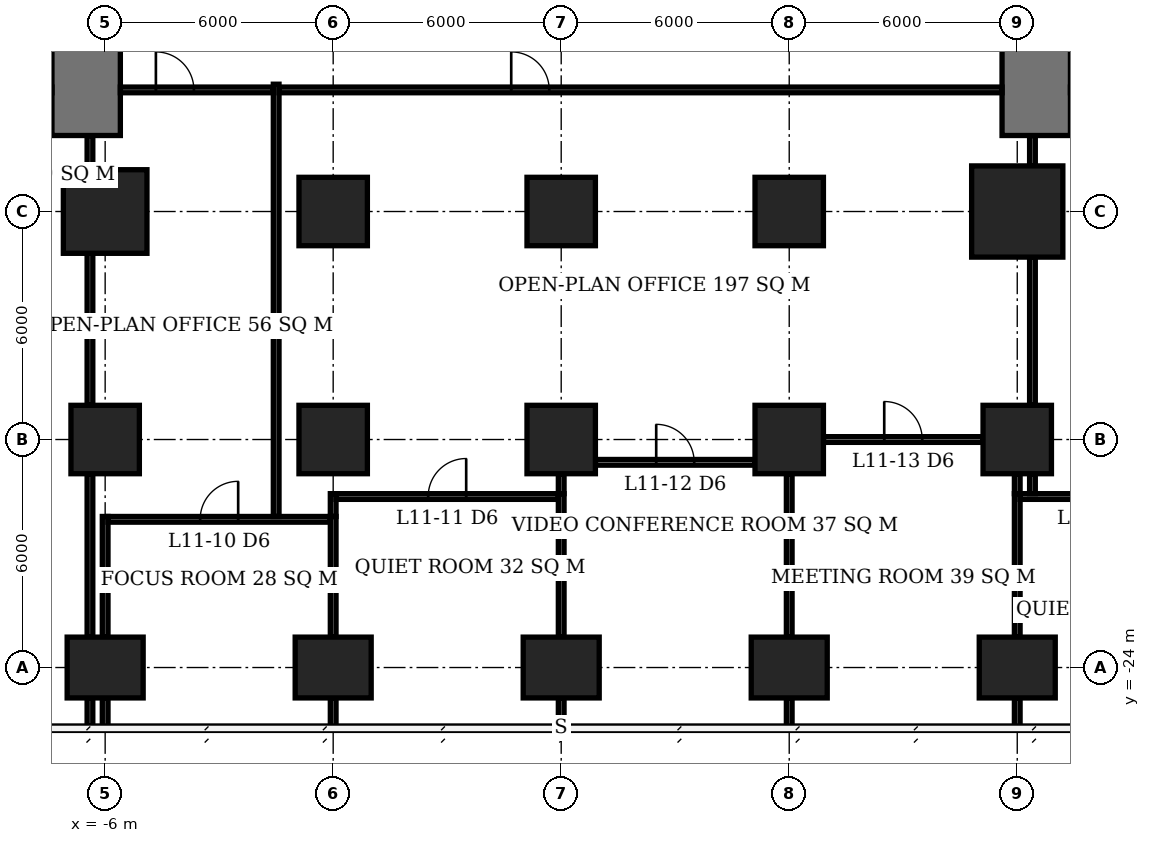
"""IFC4 building model, lengths in metres.
Left out: names, types, materials, properties, quantities, classifications, styles, units other than length and angle.
Written with IfcOpenShell. Run it as: python <this file> out.ifc"""

import sys

from ifc_helpers import new_model, si_unit, direction, frame, frame_2d, origin, origin_2d, place, context, subcontext, project, spatial, rectangle, extrude, element, fill, save


model = new_model("IFC4")
c1 = context("Model", 3, precision=1e-05, world=origin(), true_north=direction((0.0, 1.0)))
c2 = subcontext(c1, "Body", "Model", "MODEL_VIEW")
j1 = project(units=[si_unit("LENGTHUNIT", "METRE"), si_unit("PLANEANGLEUNIT", "RADIAN")], contexts=[c1])
p1 = place(None, origin())
s1 = spatial("IfcSite", under=j1, at=p1, CompositionType="ELEMENT")
p2 = place(p1, origin())
s2 = spatial("IfcBuilding", under=s1, at=p2, CompositionType="ELEMENT")
p3 = place(p2, frame((0.0, 0.0, 49.4)))
s3 = spatial("IfcBuildingStorey", under=s2, at=p3, CompositionType="ELEMENT", Elevation=49.4)
p4 = place(p3, frame((-6.0, -24.0, 0.0), z_axis=(0.0, 0.0, 1.0), x_axis=(1.0, 0.0, 0.0)))
e1 = element("IfcColumn", 1, at=p4, inside=s3, PredefinedType="COLUMN", context=c2, shape_type="SweptSolid", body=[
    extrude(rectangle(XDim=2.0, YDim=1.6, at=origin_2d()), origin(), (0.0, 0.0, 1.0), 3.9),
])
p5 = place(p3, frame((-6.0, -18.0, 0.0), z_axis=(0.0, 0.0, 1.0), x_axis=(1.0, 0.0, 0.0)))
e2 = element("IfcColumn", 2, at=p5, inside=s3, PredefinedType="COLUMN", context=c2, shape_type="SweptSolid", body=[
    extrude(rectangle(XDim=1.8, YDim=1.8, at=origin_2d()), origin(), (0.0, 0.0, 1.0), 3.9),
])
p6 = place(p3, frame((-6.0, -12.0, 0.0), z_axis=(0.0, 0.0, 1.0), x_axis=(1.0, 0.0, 0.0)))
e3 = element("IfcColumn", 3, at=p6, inside=s3, PredefinedType="COLUMN", context=c2, shape_type="SweptSolid", body=[
    extrude(rectangle(XDim=2.2, YDim=2.2, at=origin_2d()), origin(), (0.0, 0.0, 1.0), 3.9),
])
p7 = place(p3, frame((0.0, -24.0, 0.0), z_axis=(0.0, 0.0, 1.0), x_axis=(1.0, 0.0, 0.0)))
e4 = element("IfcColumn", 4, at=p7, inside=s3, PredefinedType="COLUMN", context=c2, shape_type="SweptSolid", body=[
    extrude(rectangle(XDim=2.0, YDim=1.6, at=origin_2d()), origin(), (0.0, 0.0, 1.0), 3.9),
])
for number, where, z_axis, x_axis in (
    (5, (0.0, -18.0, 0.0), (0.0, 0.0, 1.0), (1.0, 0.0, 0.0)),
    (6, (0.0, -12.0, 0.0), (0.0, 0.0, 1.0), (1.0, 0.0, 0.0)),
):
    element("IfcColumn", number, at=place(p3, frame(where, z_axis=z_axis, x_axis=x_axis)), inside=s3, PredefinedType="COLUMN", context=c2, shape_type="SweptSolid", body=[
        extrude(rectangle(XDim=1.8, YDim=1.8, at=origin_2d()), origin(), (0.0, 0.0, 1.0), 3.9),
    ])
p8 = place(p3, frame((6.0, -24.0, 0.0), z_axis=(0.0, 0.0, 1.0), x_axis=(1.0, 0.0, 0.0)))
e7 = element("IfcColumn", 7, at=p8, inside=s3, PredefinedType="COLUMN", context=c2, shape_type="SweptSolid", body=[
    extrude(rectangle(XDim=2.0, YDim=1.6, at=origin_2d()), origin(), (0.0, 0.0, 1.0), 3.9),
])
for number, where, z_axis, x_axis in (
    (8, (6.0, -18.0, 0.0), (0.0, 0.0, 1.0), (1.0, 0.0, 0.0)),
    (9, (6.0, -12.0, 0.0), (0.0, 0.0, 1.0), (1.0, 0.0, 0.0)),
):
    element("IfcColumn", number, at=place(p3, frame(where, z_axis=z_axis, x_axis=x_axis)), inside=s3, PredefinedType="COLUMN", context=c2, shape_type="SweptSolid", body=[
        extrude(rectangle(XDim=1.8, YDim=1.8, at=origin_2d()), origin(), (0.0, 0.0, 1.0), 3.9),
    ])
p9 = place(p3, frame((12.0, -24.0, 0.0), z_axis=(0.0, 0.0, 1.0), x_axis=(1.0, 0.0, 0.0)))
e10 = element("IfcColumn", 10, at=p9, inside=s3, PredefinedType="COLUMN", context=c2, shape_type="SweptSolid", body=[
    extrude(rectangle(XDim=2.0, YDim=1.6, at=origin_2d()), origin(), (0.0, 0.0, 1.0), 3.9),
])
for number, where, z_axis, x_axis in (
    (11, (12.0, -18.0, 0.0), (0.0, 0.0, 1.0), (1.0, 0.0, 0.0)),
    (12, (12.0, -12.0, 0.0), (0.0, 0.0, 1.0), (1.0, 0.0, 0.0)),
):
    element("IfcColumn", number, at=place(p3, frame(where, z_axis=z_axis, x_axis=x_axis)), inside=s3, PredefinedType="COLUMN", context=c2, shape_type="SweptSolid", body=[
        extrude(rectangle(XDim=1.8, YDim=1.8, at=origin_2d()), origin(), (0.0, 0.0, 1.0), 3.9),
    ])
p10 = place(p3, frame((18.0, -24.0, 0.0), z_axis=(0.0, 0.0, 1.0), x_axis=(1.0, 0.0, 0.0)))
e13 = element("IfcColumn", 13, at=p10, inside=s3, PredefinedType="COLUMN", context=c2, shape_type="SweptSolid", body=[
    extrude(rectangle(XDim=2.0, YDim=1.6, at=origin_2d()), origin(), (0.0, 0.0, 1.0), 3.9),
])
p11 = place(p3, frame((18.0, -18.0, 0.0), z_axis=(0.0, 0.0, 1.0), x_axis=(1.0, 0.0, 0.0)))
e14 = element("IfcColumn", 14, at=p11, inside=s3, PredefinedType="COLUMN", context=c2, shape_type="SweptSolid", body=[
    extrude(rectangle(XDim=1.8, YDim=1.8, at=origin_2d()), origin(), (0.0, 0.0, 1.0), 3.9),
])
p12 = place(p3, frame((18.0, -12.0, 0.0), z_axis=(0.0, 0.0, 1.0), x_axis=(1.0, 0.0, 0.0)))
e15 = element("IfcColumn", 15, at=p12, inside=s3, PredefinedType="COLUMN", context=c2, shape_type="SweptSolid", body=[
    extrude(rectangle(XDim=2.4, YDim=2.4, at=origin_2d()), origin(), (0.0, 0.0, 1.0), 3.9),
])
for number, where, z_axis, x_axis in (
    (16, (-6.5, -10.0, 0.0), (0.0, 0.0, 1.0), (0.0, 1.0, 0.0)),
    (17, (18.5, -10.0, 0.0), (0.0, 0.0, 1.0), (0.0, 1.0, 0.0)),
):
    element("IfcWall", number, at=place(p3, frame(where, z_axis=z_axis, x_axis=x_axis)), inside=s3, PredefinedType="SHEAR", context=c2, shape_type="SweptSolid", body=[
        extrude(rectangle(XDim=2.4, YDim=1.8, at=frame_2d((1.2, 0.0))), origin(), (0.0, 0.0, 1.0), 3.9),
    ])
p13 = place(p3, frame((-5.925, -20.1, 0.0), z_axis=(0.0, 0.0, 1.0), x_axis=(1.0, 0.0, 0.0)))
e18 = element("IfcWall", 18, at=p13, inside=s3, PredefinedType="PARTITIONING", context=c2, shape_type="SweptSolid", body=[
    extrude(rectangle(XDim=5.85, YDim=0.15, at=frame_2d((2.925, 0.0))), origin(), (0.0, 0.0, 1.0), 3.65),
])
p14 = place(p13, frame((2.425, 0.0, 0.0)))
e19 = element("IfcOpeningElement", 19, at=p14, cuts=e18, PredefinedType="OPENING", context=c2, shape_type="SweptSolid", body=[
    extrude(rectangle(XDim=1.0, YDim=2.1, at=frame_2d((0.5, 1.05))), frame((0.0, 0.085, 0.0), z_axis=(0.0, -1.0, 0.0), x_axis=(1.0, 0.0, 0.0)), (0.0, 0.0, 1.0), 0.17),
])
p15 = place(p3, frame((0.075, -19.5, 0.0), z_axis=(0.0, 0.0, 1.0), x_axis=(1.0, 0.0, 0.0)))
e20 = element("IfcWall", 20, at=p15, inside=s3, PredefinedType="PARTITIONING", context=c2, shape_type="SweptSolid", body=[
    extrude(rectangle(XDim=5.85, YDim=0.15, at=frame_2d((2.925, 0.0))), origin(), (0.0, 0.0, 1.0), 3.65),
])
p16 = place(p15, frame((2.425, 0.0, 0.0)))
e21 = element("IfcOpeningElement", 21, at=p16, cuts=e20, PredefinedType="OPENING", context=c2, shape_type="SweptSolid", body=[
    extrude(rectangle(XDim=1.0, YDim=2.1, at=frame_2d((0.5, 1.05))), frame((0.0, 0.085, 0.0), z_axis=(0.0, -1.0, 0.0), x_axis=(1.0, 0.0, 0.0)), (0.0, 0.0, 1.0), 0.17),
])
p17 = place(p3, frame((18.075, -19.5, 0.0), z_axis=(0.0, 0.0, 1.0), x_axis=(1.0, 0.0, 0.0)))
e22 = element("IfcWall", 22, at=p17, inside=s3, PredefinedType="PARTITIONING", context=c2, shape_type="SweptSolid", body=[
    extrude(rectangle(XDim=4.715, YDim=0.15, at=frame_2d((2.357, 0.0))), origin(), (0.0, 0.0, 1.0), 3.65),
])
p18 = place(p17, frame((1.82, 0.0, 0.0)))
e23 = element("IfcOpeningElement", 23, at=p18, cuts=e22, PredefinedType="OPENING", context=c2, shape_type="SweptSolid", body=[
    extrude(rectangle(XDim=1.0, YDim=2.1, at=frame_2d((0.5, 1.05))), frame((0.0, 0.085, 0.0), z_axis=(0.0, -1.0, 0.0), x_axis=(1.0, 0.0, 0.0)), (0.0, 0.0, 1.0), 0.17),
])
p19 = place(p3, frame((6.9, -18.6, 0.0), z_axis=(0.0, 0.0, 1.0), x_axis=(1.0, 0.0, 0.0)))
e24 = element("IfcWall", 24, at=p19, inside=s3, PredefinedType="PARTITIONING", context=c2, shape_type="SweptSolid", body=[
    extrude(rectangle(XDim=4.2, YDim=0.15, at=frame_2d((2.1, 0.0))), origin(), (0.0, 0.0, 1.0), 3.65),
])
p20 = place(p19, frame((1.6, 0.0, 0.0)))
e25 = element("IfcOpeningElement", 25, at=p20, cuts=e24, PredefinedType="OPENING", context=c2, shape_type="SweptSolid", body=[
    extrude(rectangle(XDim=1.0, YDim=2.1, at=frame_2d((0.5, 1.05))), frame((0.0, 0.085, 0.0), z_axis=(0.0, -1.0, 0.0), x_axis=(1.0, 0.0, 0.0)), (0.0, 0.0, 1.0), 0.17),
])
p21 = place(p3, frame((12.9, -18.0, 0.0), z_axis=(0.0, 0.0, 1.0), x_axis=(1.0, 0.0, 0.0)))
e26 = element("IfcWall", 26, at=p21, inside=s3, PredefinedType="PARTITIONING", context=c2, shape_type="SweptSolid", body=[
    extrude(rectangle(XDim=4.2, YDim=0.15, at=frame_2d((2.1, 0.0))), origin(), (0.0, 0.0, 1.0), 3.65),
])
p22 = place(p21, frame((1.6, 0.0, 0.0)))
e27 = element("IfcOpeningElement", 27, at=p22, cuts=e26, PredefinedType="OPENING", context=c2, shape_type="SweptSolid", body=[
    extrude(rectangle(XDim=1.0, YDim=2.1, at=frame_2d((0.5, 1.05))), frame((0.0, 0.085, 0.0), z_axis=(0.0, -1.0, 0.0), x_axis=(1.0, 0.0, 0.0)), (0.0, 0.0, 1.0), 0.17),
])
p23 = place(p3, frame((-6.0, -25.6, 0.0), z_axis=(0.0, 0.0, 1.0), x_axis=(0.0, 1.0, 0.0)))
e28 = element("IfcWall", 28, at=p23, inside=s3, PredefinedType="PARTITIONING", context=c2, shape_type="SweptSolid", body=[
    extrude(rectangle(XDim=0.8, YDim=0.15, at=frame_2d((0.4, 0.0))), origin(), (0.0, 0.0, 1.0), 3.65),
])
p24 = place(p3, frame((-6.0, -23.2, 0.0), z_axis=(0.0, 0.0, 1.0), x_axis=(0.0, 1.0, 0.0)))
e29 = element("IfcWall", 29, at=p24, inside=s3, PredefinedType="PARTITIONING", context=c2, shape_type="SweptSolid", body=[
    extrude(rectangle(XDim=3.175, YDim=0.15, at=frame_2d((1.587, 0.0))), origin(), (0.0, 0.0, 1.0), 3.65),
])
p25 = place(p3, frame((0.0, -25.6, 0.0), z_axis=(0.0, 0.0, 1.0), x_axis=(0.0, 1.0, 0.0)))
e30 = element("IfcWall", 30, at=p25, inside=s3, PredefinedType="PARTITIONING", context=c2, shape_type="SweptSolid", body=[
    extrude(rectangle(XDim=0.8, YDim=0.15, at=frame_2d((0.4, 0.0))), origin(), (0.0, 0.0, 1.0), 3.65),
])
p26 = place(p3, frame((0.0, -23.2, 0.0), z_axis=(0.0, 0.0, 1.0), x_axis=(0.0, 1.0, 0.0)))
e31 = element("IfcWall", 31, at=p26, inside=s3, PredefinedType="PARTITIONING", context=c2, shape_type="SweptSolid", body=[
    extrude(rectangle(XDim=3.175, YDim=0.15, at=frame_2d((1.587, 0.0))), origin(), (0.0, 0.0, 1.0), 3.65),
])
p27 = place(p3, frame((0.0, -20.025, 0.0), z_axis=(0.0, 0.0, 1.0), x_axis=(0.0, 1.0, 0.0)))
e32 = element("IfcWall", 32, at=p27, inside=s3, PredefinedType="PARTITIONING", context=c2, shape_type="SweptSolid", body=[
    extrude(rectangle(XDim=0.6, YDim=0.15, at=frame_2d((0.3, 0.0))), origin(), (0.0, 0.0, 1.0), 3.65),
])
p28 = place(p3, frame((6.0, -25.55, 0.0), z_axis=(0.0, 0.0, 1.0), x_axis=(0.0, 1.0, 0.0)))
e33 = element("IfcWall", 33, at=p28, inside=s3, PredefinedType="PARTITIONING", context=c2, shape_type="SweptSolid", body=[
    extrude(rectangle(XDim=0.75, YDim=0.15, at=frame_2d((0.375, 0.0))), origin(), (0.0, 0.0, 1.0), 3.65),
])
p29 = place(p3, frame((6.0, -23.2, 0.0), z_axis=(0.0, 0.0, 1.0), x_axis=(0.0, 1.0, 0.0)))
e34 = element("IfcWall", 34, at=p29, inside=s3, PredefinedType="PARTITIONING", context=c2, shape_type="SweptSolid", body=[
    extrude(rectangle(XDim=3.775, YDim=0.15, at=frame_2d((1.887, 0.0))), origin(), (0.0, 0.0, 1.0), 3.65),
])
p30 = place(p3, frame((6.0, -19.425, 0.0), z_axis=(0.0, 0.0, 1.0), x_axis=(0.0, 1.0, 0.0)))
e35 = element("IfcWall", 35, at=p30, inside=s3, PredefinedType="PARTITIONING", context=c2, shape_type="SweptSolid", body=[
    extrude(rectangle(XDim=0.525, YDim=0.15, at=frame_2d((0.263, 0.0))), origin(), (0.0, 0.0, 1.0), 3.65),
])
p31 = place(p3, frame((12.0, -25.6, 0.0), z_axis=(0.0, 0.0, 1.0), x_axis=(0.0, 1.0, 0.0)))
e36 = element("IfcWall", 36, at=p31, inside=s3, PredefinedType="PARTITIONING", context=c2, shape_type="SweptSolid", body=[
    extrude(rectangle(XDim=0.8, YDim=0.15, at=frame_2d((0.4, 0.0))), origin(), (0.0, 0.0, 1.0), 3.65),
])
p32 = place(p3, frame((12.0, -23.2, 0.0), z_axis=(0.0, 0.0, 1.0), x_axis=(0.0, 1.0, 0.0)))
e37 = element("IfcWall", 37, at=p32, inside=s3, PredefinedType="PARTITIONING", context=c2, shape_type="SweptSolid", body=[
    extrude(rectangle(XDim=4.3, YDim=0.15, at=frame_2d((2.15, 0.0))), origin(), (0.0, 0.0, 1.0), 3.65),
])
p33 = place(p3, frame((18.0, -25.6, 0.0), z_axis=(0.0, 0.0, 1.0), x_axis=(0.0, 1.0, 0.0)))
e38 = element("IfcWall", 38, at=p33, inside=s3, PredefinedType="PARTITIONING", context=c2, shape_type="SweptSolid", body=[
    extrude(rectangle(XDim=0.8, YDim=0.15, at=frame_2d((0.4, 0.0))), origin(), (0.0, 0.0, 1.0), 3.65),
])
p34 = place(p3, frame((18.0, -23.2, 0.0), z_axis=(0.0, 0.0, 1.0), x_axis=(0.0, 1.0, 0.0)))
e39 = element("IfcWall", 39, at=p34, inside=s3, PredefinedType="PARTITIONING", context=c2, shape_type="SweptSolid", body=[
    extrude(rectangle(XDim=3.775, YDim=0.15, at=frame_2d((1.887, 0.0))), origin(), (0.0, 0.0, 1.0), 3.65),
])
p35 = place(p3, frame((18.0, -19.425, 0.0), z_axis=(0.0, 0.0, 1.0), x_axis=(0.0, 1.0, 0.0)))
e40 = element("IfcWall", 40, at=p35, inside=s3, PredefinedType="PARTITIONING", context=c2, shape_type="SweptSolid", body=[
    extrude(rectangle(XDim=0.525, YDim=0.15, at=frame_2d((0.263, 0.0))), origin(), (0.0, 0.0, 1.0), 3.65),
])
p36 = place(p3, frame((-6.4, -25.55, 0.0), z_axis=(0.0, 0.0, 1.0), x_axis=(0.0, 1.0, 0.0)))
e41 = element("IfcWall", 41, at=p36, inside=s3, PredefinedType="PARTITIONING", context=c2, shape_type="SweptSolid", body=[
    extrude(rectangle(XDim=0.75, YDim=0.15, at=frame_2d((0.375, 0.0))), origin(), (0.0, 0.0, 1.0), 3.65),
])
p37 = place(p3, frame((-6.4, -23.2, 0.0), z_axis=(0.0, 0.0, 1.0), x_axis=(0.0, 1.0, 0.0)))
e42 = element("IfcWall", 42, at=p37, inside=s3, PredefinedType="PARTITIONING", context=c2, shape_type="SweptSolid", body=[
    extrude(rectangle(XDim=4.3, YDim=0.15, at=frame_2d((2.15, 0.0))), origin(), (0.0, 0.0, 1.0), 3.65),
])
p38 = place(p3, frame((-6.4, -17.1, 0.0), z_axis=(0.0, 0.0, 1.0), x_axis=(0.0, 1.0, 0.0)))
e43 = element("IfcWall", 43, at=p38, inside=s3, PredefinedType="PARTITIONING", context=c2, shape_type="SweptSolid", body=[
    extrude(rectangle(XDim=4.0, YDim=0.15, at=frame_2d((2.0, 0.0))), origin(), (0.0, 0.0, 1.0), 3.65),
])
p39 = place(p3, frame((-6.4, -10.9, 0.0), z_axis=(0.0, 0.0, 1.0), x_axis=(0.0, 1.0, 0.0)))
e44 = element("IfcWall", 44, at=p39, inside=s3, PredefinedType="PARTITIONING", context=c2, shape_type="SweptSolid", body=[
    extrude(rectangle(XDim=0.9, YDim=0.15, at=frame_2d((0.45, 0.0))), origin(), (0.0, 0.0, 1.0), 3.65),
])
p40 = place(p3, frame((-5.6, -8.8, 0.0), z_axis=(0.0, 0.0, 1.0), x_axis=(1.0, 0.0, 0.0)))
e45 = element("IfcWall", 45, at=p40, inside=s3, PredefinedType="PARTITIONING", context=c2, shape_type="SweptSolid", body=[
    extrude(rectangle(XDim=4.025, YDim=0.15, at=frame_2d((2.013, 0.0))), origin(), (0.0, 0.0, 1.0), 3.65),
])
p41 = place(p40, frame((0.935, 0.0, 0.0)))
e46 = element("IfcOpeningElement", 46, at=p41, cuts=e45, PredefinedType="OPENING", context=c2, shape_type="SweptSolid", body=[
    extrude(rectangle(XDim=1.0, YDim=2.1, at=frame_2d((0.5, 1.05))), frame((0.0, 0.085, 0.0), z_axis=(0.0, -1.0, 0.0), x_axis=(1.0, 0.0, 0.0)), (0.0, 0.0, 1.0), 0.17),
])
p42 = place(p3, frame((-1.5, -20.025, 0.0), z_axis=(0.0, 0.0, 1.0), x_axis=(0.0, 1.0, 0.0)))
e47 = element("IfcWall", 47, at=p42, inside=s3, PredefinedType="PARTITIONING", context=c2, shape_type="SweptSolid", body=[
    extrude(rectangle(XDim=11.375, YDim=0.15, at=frame_2d((5.688, 0.0))), origin(), (0.0, 0.0, 1.0), 3.65),
])
p43 = place(p3, frame((-1.425, -8.8, 0.0), z_axis=(0.0, 0.0, 1.0), x_axis=(1.0, 0.0, 0.0)))
e48 = element("IfcWall", 48, at=p43, inside=s3, PredefinedType="PARTITIONING", context=c2, shape_type="SweptSolid", body=[
    extrude(rectangle(XDim=19.025, YDim=0.15, at=frame_2d((9.513, 0.0))), origin(), (0.0, 0.0, 1.0), 3.65),
])
p44 = place(p43, frame((6.11, 0.0, 0.0)))
e49 = element("IfcOpeningElement", 49, at=p44, cuts=e48, PredefinedType="OPENING", context=c2, shape_type="SweptSolid", body=[
    extrude(rectangle(XDim=1.0, YDim=2.1, at=frame_2d((0.5, 1.05))), frame((0.0, 0.085, 0.0), z_axis=(0.0, -1.0, 0.0), x_axis=(1.0, 0.0, 0.0)), (0.0, 0.0, 1.0), 0.17),
])
p45 = place(p3, frame((18.4, -19.425, 0.0), z_axis=(0.0, 0.0, 1.0), x_axis=(0.0, 1.0, 0.0)))
e50 = element("IfcWall", 50, at=p45, inside=s3, PredefinedType="PARTITIONING", context=c2, shape_type="SweptSolid", body=[
    extrude(rectangle(XDim=0.525, YDim=0.15, at=frame_2d((0.263, 0.0))), origin(), (0.0, 0.0, 1.0), 3.65),
])
p46 = place(p3, frame((18.4, -17.1, 0.0), z_axis=(0.0, 0.0, 1.0), x_axis=(0.0, 1.0, 0.0)))
e51 = element("IfcWall", 51, at=p46, inside=s3, PredefinedType="PARTITIONING", context=c2, shape_type="SweptSolid", body=[
    extrude(rectangle(XDim=3.9, YDim=0.15, at=frame_2d((1.95, 0.0))), origin(), (0.0, 0.0, 1.0), 3.65),
])
p47 = place(p3, frame((18.4, -10.8, 0.0), z_axis=(0.0, 0.0, 1.0), x_axis=(0.0, 1.0, 0.0)))
e52 = element("IfcWall", 52, at=p47, inside=s3, PredefinedType="PARTITIONING", context=c2, shape_type="SweptSolid", body=[
    extrude(rectangle(XDim=0.8, YDim=0.15, at=frame_2d((0.4, 0.0))), origin(), (0.0, 0.0, 1.0), 3.65),
])
p48 = place(p14, origin())
e53 = element("IfcDoor", 53, at=p48, inside=s3, OperationType="SINGLE_SWING_RIGHT", PredefinedType="DOOR", context=c2, shape_type="SweptSolid", body=[
    extrude(rectangle(XDim=1.0, YDim=2.1, at=frame_2d((0.5, 1.05))), frame((0.0, 0.025, 0.0), z_axis=(0.0, -1.0, 0.0), x_axis=(1.0, 0.0, 0.0)), (0.0, 0.0, 1.0), 0.05),
])
fill(e19, e53)
p49 = place(p16, origin())
e54 = element("IfcDoor", 54, at=p49, inside=s3, OperationType="SINGLE_SWING_RIGHT", PredefinedType="DOOR", context=c2, shape_type="SweptSolid", body=[
    extrude(rectangle(XDim=1.0, YDim=2.1, at=frame_2d((0.5, 1.05))), frame((0.0, 0.025, 0.0), z_axis=(0.0, -1.0, 0.0), x_axis=(1.0, 0.0, 0.0)), (0.0, 0.0, 1.0), 0.05),
])
fill(e21, e54)
p50 = place(p20, origin())
e55 = element("IfcDoor", 55, at=p50, inside=s3, OperationType="SINGLE_SWING_LEFT", PredefinedType="DOOR", context=c2, shape_type="SweptSolid", body=[
    extrude(rectangle(XDim=1.0, YDim=2.1, at=frame_2d((0.5, 1.05))), frame((0.0, 0.025, 0.0), z_axis=(0.0, -1.0, 0.0), x_axis=(1.0, 0.0, 0.0)), (0.0, 0.0, 1.0), 0.05),
])
fill(e25, e55)
p51 = place(p22, origin())
e56 = element("IfcDoor", 56, at=p51, inside=s3, OperationType="SINGLE_SWING_LEFT", PredefinedType="DOOR", context=c2, shape_type="SweptSolid", body=[
    extrude(rectangle(XDim=1.0, YDim=2.1, at=frame_2d((0.5, 1.05))), frame((0.0, 0.025, 0.0), z_axis=(0.0, -1.0, 0.0), x_axis=(1.0, 0.0, 0.0)), (0.0, 0.0, 1.0), 0.05),
])
fill(e27, e56)
p52 = place(p41, origin())
e57 = element("IfcDoor", 57, at=p52, inside=s3, OperationType="SINGLE_SWING_LEFT", PredefinedType="DOOR", context=c2, shape_type="SweptSolid", body=[
    extrude(rectangle(XDim=1.0, YDim=2.1, at=frame_2d((0.5, 1.05))), frame((0.0, 0.025, 0.0), z_axis=(0.0, -1.0, 0.0), x_axis=(1.0, 0.0, 0.0)), (0.0, 0.0, 1.0), 0.05),
])
fill(e46, e57)
p53 = place(p44, origin())
e58 = element("IfcDoor", 58, at=p53, inside=s3, OperationType="SINGLE_SWING_LEFT", PredefinedType="DOOR", context=c2, shape_type="SweptSolid", body=[
    extrude(rectangle(XDim=1.0, YDim=2.1, at=frame_2d((0.5, 1.05))), frame((0.0, 0.025, 0.0), z_axis=(0.0, -1.0, 0.0), x_axis=(1.0, 0.0, 0.0)), (0.0, 0.0, 1.0), 0.05),
])
fill(e49, e58)
save(model, sys.argv[1])
